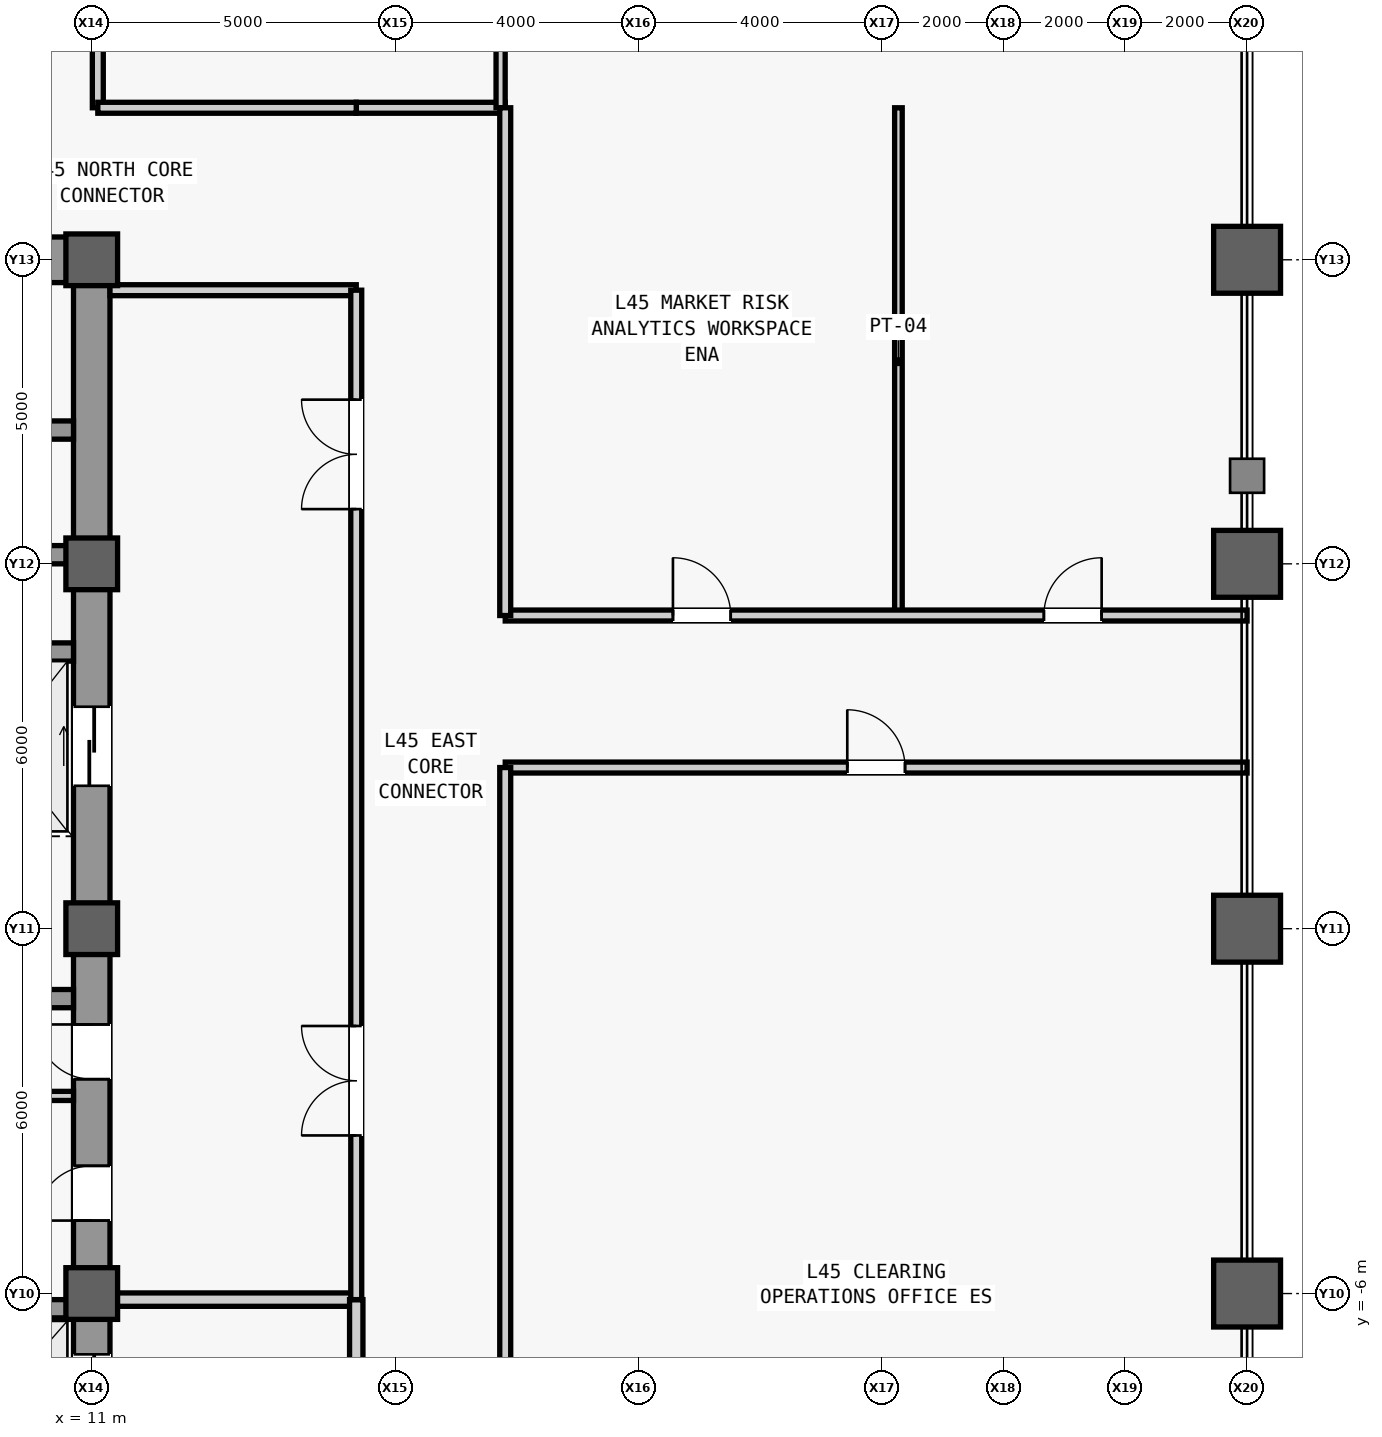
"""IFC4 building model, lengths in metres.
Left out: names, types, materials, properties, quantities, classifications, styles, units other than length and angle.
Written with IfcOpenShell. Run it as: python <this file> out.ifc"""

import sys

from ifc_helpers import new_model, si_unit, direction, frame, frame_2d, origin, origin_2d, place, context, subcontext, project, spatial, rectangle, hollow_rectangle, extrude, source, transform, mapped, element, fill, save


model = new_model("IFC4")
c1 = context("Model", 3, precision=1e-05, world=origin(), true_north=direction((0.0, 1.0)))
c2 = subcontext(c1, "Body", "Model", "MODEL_VIEW")
j1 = project(units=[si_unit("LENGTHUNIT", "METRE"), si_unit("PLANEANGLEUNIT", "RADIAN")], contexts=[c1])
p1 = place(None, origin())
s1 = spatial("IfcSite", under=j1, at=p1, CompositionType="ELEMENT")
p2 = place(p1, origin())
s2 = spatial("IfcBuilding", under=s1, at=p2, CompositionType="ELEMENT")
p3 = place(p2, frame((0.0, 0.0, 195.1)))
s3 = spatial("IfcBuildingStorey", under=s2, at=p3, CompositionType="ELEMENT", Elevation=195.1)
m1 = source(origin(), c2, "Body", "SweptSolid", [
    extrude(rectangle(XDim=22.0, YDim=0.6, at=frame_2d((11.0, 0.0))), origin(), (0.0, 0.0, 1.0), 3.78),
])
p4 = place(p3, frame((11.0, -11.0, 0.0), z_axis=(0.0, 0.0, 1.0), x_axis=(0.0, 1.0, 0.0)))
e1 = element("IfcWall", 1, at=p4, inside=s3, PredefinedType="SHEAR", context=c2, shape_type="MappedRepresentation", body=[
    mapped(m1, transform((0.0, 0.0, 0.0), scale=1.0)),
])
m2 = source(origin(), c2, "Body", "SweptSolid", [
    extrude(rectangle(XDim=1.1, YDim=2.2, at=frame_2d((0.55, 1.1))), frame((0.0, 0.31, 0.0), z_axis=(0.0, -1.0, 0.0), x_axis=(1.0, 0.0, 0.0)), (0.0, 0.0, 1.0), 0.62),
])
p5 = place(p4, frame((0.8, 0.0, 0.0)))
e2 = element("IfcOpeningElement", 2, at=p5, cuts=e1, PredefinedType="OPENING", context=c2, shape_type="MappedRepresentation", body=[
    mapped(m2, transform((0.0, 0.0, 0.0), scale=1.0)),
])
m3 = source(origin(), c2, "Body", "SweptSolid", [
    extrude(rectangle(XDim=0.9, YDim=2.15, at=frame_2d((0.45, 1.075))), frame((0.0, 0.31, 0.0), z_axis=(0.0, -1.0, 0.0), x_axis=(1.0, 0.0, 0.0)), (0.0, 0.0, 1.0), 0.62),
])
p6 = place(p4, frame((6.2, 0.0, 0.0)))
e3 = element("IfcOpeningElement", 3, at=p6, cuts=e1, PredefinedType="OPENING", context=c2, shape_type="MappedRepresentation", body=[
    mapped(m3, transform((0.0, 0.0, 0.0), scale=1.0)),
])
p7 = place(p4, frame((8.525, 0.0, 0.0)))
e4 = element("IfcOpeningElement", 4, at=p7, cuts=e1, PredefinedType="OPENING", context=c2, shape_type="MappedRepresentation", body=[
    mapped(m3, transform((0.0, 0.0, 0.0), scale=1.0)),
])
m4 = source(origin(), c2, "Body", "SweptSolid", [
    extrude(rectangle(XDim=1.3, YDim=2.3, at=frame_2d((0.65, 1.15))), frame((0.0, 0.31, 0.0), z_axis=(0.0, -1.0, 0.0), x_axis=(1.0, 0.0, 0.0)), (0.0, 0.0, 1.0), 0.62),
])
p8 = place(p4, frame((2.7, 0.0, 0.0)))
e5 = element("IfcOpeningElement", 5, at=p8, cuts=e1, PredefinedType="OPENING", context=c2, shape_type="MappedRepresentation", body=[
    mapped(m4, transform((0.0, 0.0, 0.0), scale=1.0)),
])
p9 = place(p4, frame((13.35, 0.0, 0.0)))
e6 = element("IfcOpeningElement", 6, at=p9, cuts=e1, PredefinedType="OPENING", context=c2, shape_type="MappedRepresentation", body=[
    mapped(m4, transform((0.0, 0.0, 0.0), scale=1.0)),
])
m5 = source(origin(), c2, "Body", "SweptSolid", [
    extrude(rectangle(XDim=5.85, YDim=0.75, at=frame_2d((2.925, 0.0))), origin(), (0.0, 0.0, 1.0), 3.78),
])
p10 = place(p3, frame((4.85, 11.0, 0.0), z_axis=(0.0, 0.0, 1.0), x_axis=(1.0, 0.0, 0.0)))
e7 = element("IfcWall", 7, at=p10, inside=s3, PredefinedType="SHEAR", context=c2, shape_type="MappedRepresentation", body=[
    mapped(m5, transform((0.0, 0.0, 0.0), scale=1.0)),
])
m6 = source(origin(), c2, "Body", "SweptSolid", [
    extrude(rectangle(XDim=1.05, YDim=2.2, at=frame_2d((0.525, 1.1))), frame((0.0, 0.385, 0.0), z_axis=(0.0, -1.0, 0.0), x_axis=(1.0, 0.0, 0.0)), (0.0, 0.0, 1.0), 0.77),
])
p11 = place(p10, frame((1.375, 0.0, 0.0)))
e8 = element("IfcOpeningElement", 8, at=p11, cuts=e7, PredefinedType="OPENING", context=c2, shape_type="MappedRepresentation", body=[
    mapped(m6, transform((0.0, 0.0, 0.0), scale=1.0)),
])
m7 = source(origin(), c2, "Body", "SweptSolid", [
    extrude(rectangle(XDim=5.6, YDim=0.3, at=frame_2d((2.8, 0.0))), origin(), (0.0, 0.0, 1.0), 3.78),
])
p12 = place(p3, frame((5.1, -1.15, 0.0), z_axis=(0.0, 0.0, 1.0), x_axis=(1.0, 0.0, 0.0)))
e9 = element("IfcWall", 9, at=p12, inside=s3, PredefinedType="SHEAR", context=c2, shape_type="MappedRepresentation", body=[
    mapped(m7, transform((0.0, 0.0, 0.0), scale=1.0)),
])
m8 = source(origin(), c2, "Body", "SweptSolid", [
    extrude(rectangle(XDim=0.85, YDim=0.85, at=origin_2d()), origin(), (0.0, 0.0, 1.0), 4.0),
])
for number, where, z_axis, x_axis in (
    (10, (11.0, -6.0, 0.0), (0.0, 0.0, 1.0), (1.0, 0.0, 0.0)),
    (11, (11.0, 0.0, 0.0), (0.0, 0.0, 1.0), (1.0, 0.0, 0.0)),
    (12, (11.0, 6.0, 0.0), (0.0, 0.0, 1.0), (1.0, 0.0, 0.0)),
    (13, (11.0, 11.0, 0.0), (0.0, 0.0, 1.0), (1.0, 0.0, 0.0)),
):
    element("IfcColumn", number, at=place(p3, frame(where, z_axis=z_axis, x_axis=x_axis)), inside=s3, PredefinedType="COLUMN", context=c2, shape_type="MappedRepresentation", body=[
        mapped(m8, transform((0.0, 0.0, 0.0), scale=1.0)),
    ])
m9 = source(origin(), c2, "Body", "SweptSolid", [
    extrude(hollow_rectangle(XDim=1.1, YDim=1.1, WallThickness=0.06, at=origin_2d()), origin(), (0.0, 0.0, 1.0), 4.0),
])
for number, where, z_axis, x_axis in (
    (14, (30.0, -6.0, 0.0), (0.0, 0.0, 1.0), (1.0, 0.0, 0.0)),
    (15, (30.0, 0.0, 0.0), (0.0, 0.0, 1.0), (1.0, 0.0, 0.0)),
    (16, (30.0, 6.0, 0.0), (0.0, 0.0, 1.0), (1.0, 0.0, 0.0)),
    (17, (30.0, 11.0, 0.0), (0.0, 0.0, 1.0), (1.0, 0.0, 0.0)),
):
    element("IfcColumn", number, at=place(p3, frame(where, z_axis=z_axis, x_axis=x_axis)), inside=s3, PredefinedType="COLUMN", context=c2, shape_type="MappedRepresentation", body=[
        mapped(m9, transform((0.0, 0.0, 0.0), scale=1.0)),
    ])
m10 = source(origin(), c2, "Body", "SweptSolid", [
    extrude(rectangle(XDim=2.2, YDim=0.3, at=frame_2d((1.1, 0.0))), origin(), (0.0, 0.0, 1.0), 3.78),
])
p13 = place(p3, frame((8.5, -6.25, 0.0), z_axis=(0.0, 0.0, 1.0), x_axis=(1.0, 0.0, 0.0)))
e18 = element("IfcWall", 18, at=p13, inside=s3, PredefinedType="SHEAR", context=c2, shape_type="MappedRepresentation", body=[
    mapped(m10, transform((0.0, 0.0, 0.0), scale=1.0)),
])
m11 = source(origin(), c2, "Body", "SweptSolid", [
    extrude(rectangle(XDim=2.3, YDim=0.3, at=frame_2d((1.15, 0.0))), origin(), (0.0, 0.0, 1.0), 3.78),
])
for number, where, z_axis, x_axis in (
    (19, (8.4, 4.55, 0.0), (0.0, 0.0, 1.0), (1.0, 0.0, 0.0)),
    (20, (8.4, 6.15, 0.0), (0.0, 0.0, 1.0), (1.0, 0.0, 0.0)),
    (21, (8.4, 8.2, 0.0), (0.0, 0.0, 1.0), (1.0, 0.0, 0.0)),
):
    element("IfcWall", number, at=place(p3, frame(where, z_axis=z_axis, x_axis=x_axis)), inside=s3, PredefinedType="SHEAR", context=c2, shape_type="MappedRepresentation", body=[
        mapped(m11, transform((0.0, 0.0, 0.0), scale=1.0)),
    ])
m12 = source(origin(), c2, "Body", "SweptSolid", [
    extrude(rectangle(XDim=2.05, YDim=0.15, at=frame_2d((1.025, 0.0))), origin(), (0.0, 0.0, 1.0), 3.78),
])
p14 = place(p3, frame((8.65, -2.75, 0.0), z_axis=(0.0, 0.0, 1.0), x_axis=(1.0, 0.0, 0.0)))
e22 = element("IfcWall", 22, at=p14, inside=s3, PredefinedType="PARTITIONING", context=c2, shape_type="MappedRepresentation", body=[
    mapped(m12, transform((0.0, 0.0, 0.0), scale=1.0)),
])
m13 = source(origin(), c2, "Body", "SweptSolid", [
    extrude(rectangle(XDim=4.05, YDim=0.22, at=frame_2d((2.025, 0.0))), origin(), (0.0, 0.0, 1.0), 3.007),
])
p15 = place(p3, frame((11.3, -6.1, 0.0), z_axis=(0.0, 0.0, 1.0), x_axis=(1.0, 0.0, 0.0)))
e23 = element("IfcWall", 23, at=p15, inside=s3, PredefinedType="PARTITIONING", context=c2, shape_type="MappedRepresentation", body=[
    mapped(m13, transform((0.0, 0.0, 0.0), scale=1.0)),
])
m14 = source(origin(), c2, "Body", "SweptSolid", [
    extrude(rectangle(XDim=4.4, YDim=0.22, at=frame_2d((2.2, 0.0))), origin(), (0.0, 0.0, 1.0), 3.78),
])
p16 = place(p3, frame((15.35, -10.5, 0.0), z_axis=(0.0, 0.0, 1.0), x_axis=(0.0, 1.0, 0.0)))
e24 = element("IfcWall", 24, at=p16, inside=s3, PredefinedType="PARTITIONING", context=c2, shape_type="MappedRepresentation", body=[
    mapped(m14, transform((0.0, 0.0, 0.0), scale=1.0)),
])
m15 = source(origin(), c2, "Body", "SweptSolid", [
    extrude(rectangle(XDim=1.2, YDim=2.2, at=frame_2d((0.6, 1.1))), frame((0.0, 0.12, 0.0), z_axis=(0.0, -1.0, 0.0), x_axis=(1.0, 0.0, 0.0)), (0.0, 0.0, 1.0), 0.24),
])
p17 = place(p16, frame((1.6, 0.0, 0.0)))
e25 = element("IfcOpeningElement", 25, at=p17, cuts=e24, PredefinedType="OPENING", context=c2, shape_type="MappedRepresentation", body=[
    mapped(m15, transform((0.0, 0.0, 0.0), scale=1.0)),
])
m16 = source(origin(), c2, "Body", "SweptSolid", [
    extrude(rectangle(XDim=4.05, YDim=0.18, at=frame_2d((2.025, 0.0))), origin(), (0.0, 0.0, 1.0), 3.78),
])
p18 = place(p3, frame((11.3, 10.5, 0.0), z_axis=(0.0, 0.0, 1.0), x_axis=(1.0, 0.0, 0.0)))
e26 = element("IfcWall", 26, at=p18, inside=s3, PredefinedType="PARTITIONING", context=c2, shape_type="MappedRepresentation", body=[
    mapped(m16, transform((0.0, 0.0, 0.0), scale=1.0)),
])
m17 = source(origin(), c2, "Body", "SweptSolid", [
    extrude(rectangle(XDim=16.6, YDim=0.18, at=frame_2d((8.3, 0.0))), origin(), (0.0, 0.0, 1.0), 3.78),
])
p19 = place(p3, frame((15.35, -6.1, 0.0), z_axis=(0.0, 0.0, 1.0), x_axis=(0.0, 1.0, 0.0)))
e27 = element("IfcWall", 27, at=p19, inside=s3, PredefinedType="PARTITIONING", context=c2, shape_type="MappedRepresentation", body=[
    mapped(m17, transform((0.0, 0.0, 0.0), scale=1.0)),
])
m18 = source(origin(), c2, "Body", "SweptSolid", [
    extrude(rectangle(XDim=1.8, YDim=2.25, at=frame_2d((0.9, 1.125))), frame((0.0, 0.1, 0.0), z_axis=(0.0, -1.0, 0.0), x_axis=(1.0, 0.0, 0.0)), (0.0, 0.0, 1.0), 0.2),
])
p20 = place(p19, frame((2.7, 0.0, 0.0)))
e28 = element("IfcOpeningElement", 28, at=p20, cuts=e27, PredefinedType="OPENING", context=c2, shape_type="MappedRepresentation", body=[
    mapped(m18, transform((0.0, 0.0, 0.0), scale=1.0)),
])
p21 = place(p19, frame((13.0, 0.0, 0.0)))
e29 = element("IfcOpeningElement", 29, at=p21, cuts=e27, PredefinedType="OPENING", context=c2, shape_type="MappedRepresentation", body=[
    mapped(m18, transform((0.0, 0.0, 0.0), scale=1.0)),
])
m19 = source(origin(), c2, "Body", "SweptSolid", [
    extrude(rectangle(XDim=2.45, YDim=0.18, at=frame_2d((1.225, 0.0))), origin(), (0.0, 0.0, 1.0), 3.78),
])
p22 = place(p3, frame((15.35, 13.5, 0.0), z_axis=(0.0, 0.0, 1.0), x_axis=(1.0, 0.0, 0.0)))
e30 = element("IfcWall", 30, at=p22, inside=s3, PredefinedType="PARTITIONING", context=c2, shape_type="MappedRepresentation", body=[
    mapped(m19, transform((0.0, 0.0, 0.0), scale=1.0)),
])
m20 = source(origin(), c2, "Body", "SweptSolid", [
    extrude(rectangle(XDim=16.5, YDim=0.15, at=frame_2d((8.25, 0.0))), origin(), (0.0, 0.0, 1.0), 3.78),
])
p23 = place(p3, frame((17.724, 13.5, 0.0), z_axis=(0.0, 0.0, 1.0), x_axis=(0.0, 1.0, 0.0)))
e31 = element("IfcWall", 31, at=p23, inside=s3, PredefinedType="PARTITIONING", context=c2, shape_type="MappedRepresentation", body=[
    mapped(m20, transform((0.0, 0.0, 0.0), scale=1.0)),
])
m21 = source(origin(), c2, "Body", "SweptSolid", [
    extrude(rectangle(XDim=0.95, YDim=2.15, at=frame_2d((0.475, 1.075))), frame((0.0, 0.085, 0.0), z_axis=(0.0, -1.0, 0.0), x_axis=(1.0, 0.0, 0.0)), (0.0, 0.0, 1.0), 0.17),
])
p24 = place(p23, frame((11.9, 0.0, 0.0)))
e32 = element("IfcOpeningElement", 32, at=p24, cuts=e31, PredefinedType="OPENING", context=c2, shape_type="MappedRepresentation", body=[
    mapped(m21, transform((0.0, 0.0, 0.0), scale=1.0)),
])
m22 = source(origin(), c2, "Body", "SweptSolid", [
    extrude(rectangle(XDim=16.5, YDim=0.18, at=frame_2d((8.25, 0.0))), origin(), (0.0, 0.0, 1.0), 3.007),
])
p25 = place(p3, frame((11.1, 13.5, 0.0), z_axis=(0.0, 0.0, 1.0), x_axis=(0.0, 1.0, 0.0)))
e33 = element("IfcWall", 33, at=p25, inside=s3, PredefinedType="PARTITIONING", context=c2, shape_type="MappedRepresentation", body=[
    mapped(m22, transform((0.0, 0.0, 0.0), scale=1.0)),
])
m23 = source(origin(), c2, "Body", "SweptSolid", [
    extrude(rectangle(XDim=1.05, YDim=2.2, at=frame_2d((0.525, 1.1))), frame((0.0, 0.1, 0.0), z_axis=(0.0, -1.0, 0.0), x_axis=(1.0, 0.0, 0.0)), (0.0, 0.0, 1.0), 0.2),
])
p26 = place(p25, frame((11.85, 0.0, 0.0)))
e34 = element("IfcOpeningElement", 34, at=p26, cuts=e33, PredefinedType="OPENING", context=c2, shape_type="MappedRepresentation", body=[
    mapped(m23, transform((0.0, 0.0, 0.0), scale=1.0)),
])
m24 = source(origin(), c2, "Body", "SweptSolid", [
    extrude(rectangle(XDim=4.25, YDim=0.18, at=frame_2d((2.125, 0.0))), origin(), (0.0, 0.0, 1.0), 3.78),
])
p27 = place(p3, frame((11.1, 13.5, 0.0), z_axis=(0.0, 0.0, 1.0), x_axis=(1.0, 0.0, 0.0)))
e35 = element("IfcWall", 35, at=p27, inside=s3, PredefinedType="PARTITIONING", context=c2, shape_type="MappedRepresentation", body=[
    mapped(m24, transform((0.0, 0.0, 0.0), scale=1.0)),
])
m25 = source(origin(), c2, "Body", "SweptSolid", [
    extrude(rectangle(XDim=12.2, YDim=0.18, at=frame_2d((6.1, 0.0))), origin(), (0.0, 0.0, 1.0), 3.78),
])
p28 = place(p3, frame((17.8, 2.65, 0.0), z_axis=(0.0, 0.0, 1.0), x_axis=(1.0, 0.0, 0.0)))
e36 = element("IfcWall", 36, at=p28, inside=s3, PredefinedType="PARTITIONING", context=c2, shape_type="MappedRepresentation", body=[
    mapped(m25, transform((0.0, 0.0, 0.0), scale=1.0)),
])
m26 = source(origin(), c2, "Body", "SweptSolid", [
    extrude(rectangle(XDim=0.95, YDim=2.15, at=frame_2d((0.475, 1.075))), frame((0.0, 0.1, 0.0), z_axis=(0.0, -1.0, 0.0), x_axis=(1.0, 0.0, 0.0)), (0.0, 0.0, 1.0), 0.2),
])
p29 = place(p28, frame((5.625, 0.0, 0.0)))
e37 = element("IfcOpeningElement", 37, at=p29, cuts=e36, PredefinedType="OPENING", context=c2, shape_type="MappedRepresentation", body=[
    mapped(m26, transform((0.0, 0.0, 0.0), scale=1.0)),
])
m27 = source(origin(), c2, "Body", "SweptSolid", [
    extrude(rectangle(XDim=16.85, YDim=0.18, at=frame_2d((8.425, 0.0))), origin(), (0.0, 0.0, 1.0), 3.78),
])
p30 = place(p3, frame((17.8, -14.2, 0.0), z_axis=(0.0, 0.0, 1.0), x_axis=(0.0, 1.0, 0.0)))
e38 = element("IfcWall", 38, at=p30, inside=s3, PredefinedType="PARTITIONING", context=c2, shape_type="MappedRepresentation", body=[
    mapped(m27, transform((0.0, 0.0, 0.0), scale=1.0)),
])
m28 = source(origin(), c2, "Body", "SweptSolid", [
    extrude(rectangle(XDim=8.35, YDim=0.125, at=frame_2d((4.175, 0.0))), origin(), (0.0, 0.0, 1.0), 3.78),
])
p31 = place(p3, frame((24.266, 5.15, 0.0), z_axis=(0.0, 0.0, 1.0), x_axis=(0.0, 1.0, 0.0)))
e39 = element("IfcWall", 39, at=p31, inside=s3, PredefinedType="PARTITIONING", context=c2, shape_type="MappedRepresentation", body=[
    mapped(m28, transform((0.0, 0.0, 0.0), scale=1.0)),
])
p32 = place(p3, frame((17.8, 5.15, 0.0), z_axis=(0.0, 0.0, 1.0), x_axis=(1.0, 0.0, 0.0)))
e40 = element("IfcWall", 40, at=p32, inside=s3, PredefinedType="PARTITIONING", context=c2, shape_type="MappedRepresentation", body=[
    mapped(m25, transform((0.0, 0.0, 0.0), scale=1.0)),
])
p33 = place(p32, frame((2.758, 0.0, 0.0)))
e41 = element("IfcOpeningElement", 41, at=p33, cuts=e40, PredefinedType="OPENING", context=c2, shape_type="MappedRepresentation", body=[
    mapped(m26, transform((0.0, 0.0, 0.0), scale=1.0)),
])
p34 = place(p32, frame((8.858, 0.0, 0.0)))
e42 = element("IfcOpeningElement", 42, at=p34, cuts=e40, PredefinedType="OPENING", context=c2, shape_type="MappedRepresentation", body=[
    mapped(m26, transform((0.0, 0.0, 0.0), scale=1.0)),
])
m29 = source(origin(), c2, "Body", "SweptSolid", [
    extrude(rectangle(XDim=8.35, YDim=0.18, at=frame_2d((4.175, 0.0))), origin(), (0.0, 0.0, 1.0), 3.78),
])
p35 = place(p3, frame((17.8, 5.15, 0.0), z_axis=(0.0, 0.0, 1.0), x_axis=(0.0, 1.0, 0.0)))
e43 = element("IfcWall", 43, at=p35, inside=s3, PredefinedType="PARTITIONING", context=c2, shape_type="MappedRepresentation", body=[
    mapped(m29, transform((0.0, 0.0, 0.0), scale=1.0)),
])
m30 = source(origin(), c2, "Body", "SweptSolid", [
    extrude(rectangle(XDim=0.9, YDim=2.15, at=frame_2d((0.45, 1.075))), frame((0.0, 0.025, 0.0), z_axis=(0.0, -1.0, 0.0), x_axis=(1.0, 0.0, 0.0)), (0.0, 0.0, 1.0), 0.05),
])
p36 = place(p6, origin())
e44 = element("IfcDoor", 44, at=p36, inside=s3, OperationType="SINGLE_SWING_LEFT", PredefinedType="DOOR", context=c2, shape_type="MappedRepresentation", body=[
    mapped(m30, transform((0.0, 0.0, 0.0), scale=1.0)),
])
fill(e3, e44)
p37 = place(p7, origin())
e45 = element("IfcDoor", 45, at=p37, inside=s3, OperationType="SINGLE_SWING_RIGHT", PredefinedType="DOOR", context=c2, shape_type="MappedRepresentation", body=[
    mapped(m30, transform((0.0, 0.0, 0.0), scale=1.0)),
])
fill(e4, e45)
m31 = source(origin(), c2, "Body", "SweptSolid", [
    extrude(rectangle(XDim=1.8, YDim=2.25, at=frame_2d((0.9, 1.125))), frame((0.0, 0.025, 0.0), z_axis=(0.0, -1.0, 0.0), x_axis=(1.0, 0.0, 0.0)), (0.0, 0.0, 1.0), 0.05),
])
p38 = place(p20, origin())
e46 = element("IfcDoor", 46, at=p38, inside=s3, OperationType="SINGLE_SWING_RIGHT", PredefinedType="DOOR", context=c2, shape_type="MappedRepresentation", body=[
    mapped(m31, transform((0.0, 0.0, 0.0), scale=1.0)),
])
fill(e28, e46)
p39 = place(p21, origin())
e47 = element("IfcDoor", 47, at=p39, inside=s3, OperationType="SINGLE_SWING_LEFT", PredefinedType="DOOR", context=c2, shape_type="MappedRepresentation", body=[
    mapped(m31, transform((0.0, 0.0, 0.0), scale=1.0)),
])
fill(e29, e47)
m32 = source(origin(), c2, "Body", "SweptSolid", [
    extrude(rectangle(XDim=0.95, YDim=2.15, at=frame_2d((0.475, 1.075))), frame((0.0, 0.025, 0.0), z_axis=(0.0, -1.0, 0.0), x_axis=(1.0, 0.0, 0.0)), (0.0, 0.0, 1.0), 0.05),
])
p40 = place(p29, origin())
e48 = element("IfcDoor", 48, at=p40, inside=s3, OperationType="SINGLE_SWING_LEFT", PredefinedType="DOOR", context=c2, shape_type="MappedRepresentation", body=[
    mapped(m32, transform((0.0, 0.0, 0.0), scale=1.0)),
])
fill(e37, e48)
p41 = place(p33, origin())
e49 = element("IfcDoor", 49, at=p41, inside=s3, OperationType="SINGLE_SWING_LEFT", PredefinedType="DOOR", context=c2, shape_type="MappedRepresentation", body=[
    mapped(m32, transform((0.0, 0.0, 0.0), scale=1.0)),
])
fill(e41, e49)
p42 = place(p34, origin())
e50 = element("IfcDoor", 50, at=p42, inside=s3, OperationType="SINGLE_SWING_RIGHT", PredefinedType="DOOR", context=c2, shape_type="MappedRepresentation", body=[
    mapped(m32, transform((0.0, 0.0, 0.0), scale=1.0)),
])
fill(e42, e50)
m33 = source(origin(), c2, "Body", "SweptSolid", [
    extrude(rectangle(XDim=1.3, YDim=2.3, at=frame_2d((0.65, 1.15))), frame((0.0, 0.025, 0.0), z_axis=(0.0, -1.0, 0.0), x_axis=(1.0, 0.0, 0.0)), (0.0, 0.0, 1.0), 0.05),
])
p43 = place(p8, origin())
e51 = element("IfcDoor", 51, at=p43, inside=s3, OperationType="SLIDING_TO_LEFT", PredefinedType="DOOR", context=c2, shape_type="MappedRepresentation", body=[
    mapped(m33, transform((0.0, 0.0, 0.0), scale=1.0)),
])
fill(e5, e51)
p44 = place(p9, origin())
e52 = element("IfcDoor", 52, at=p44, inside=s3, OperationType="SLIDING_TO_LEFT", PredefinedType="DOOR", context=c2, shape_type="MappedRepresentation", body=[
    mapped(m33, transform((0.0, 0.0, 0.0), scale=1.0)),
])
fill(e6, e52)
save(model, sys.argv[1])
